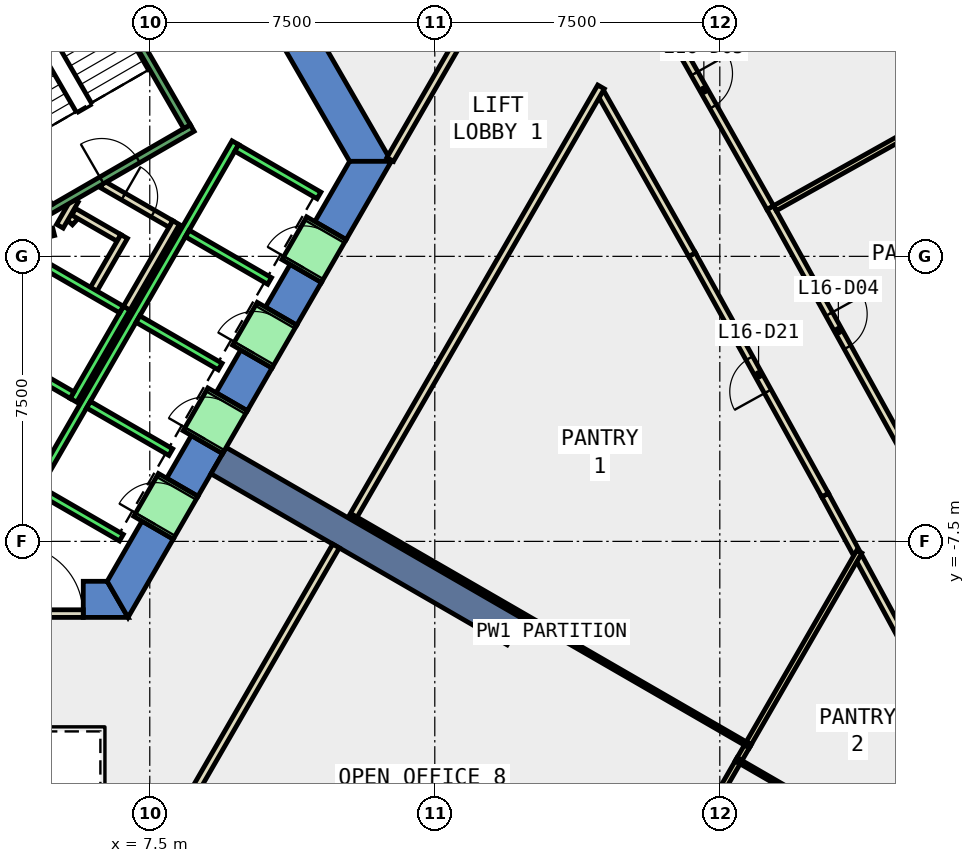
"""IFC4 building model, lengths in metres.
Left out: names, types, materials, properties, quantities, classifications, styles, units other than length and angle.
Written with IfcOpenShell. Run it as: python <this file> out.ifc"""

import sys

from ifc_helpers import new_model, si_unit, direction, frame, frame_2d, origin, place, context, subcontext, project, spatial, polyline, rectangle, outline, extrude, element, fill, save


model = new_model("IFC4")
c1 = context("Model", 3, precision=1e-05, world=origin(), true_north=direction((0.0, 1.0)))
c2 = subcontext(c1, "Body", "Model", "MODEL_VIEW")
j1 = project(units=[si_unit("LENGTHUNIT", "METRE"), si_unit("PLANEANGLEUNIT", "RADIAN")], contexts=[c1])
p1 = place(None, origin())
s1 = spatial("IfcSite", under=j1, at=p1, CompositionType="ELEMENT")
p2 = place(p1, origin())
s2 = spatial("IfcBuilding", under=s1, at=p2, CompositionType="ELEMENT")
p3 = place(p2, frame((0.0, 0.0, 77.0)))
s3 = spatial("IfcBuildingStorey", under=s2, at=p3, CompositionType="ELEMENT", Elevation=77.0)
p4 = place(p3, frame((0.0, 0.0, -0.4)))
e1 = element("IfcWall", 1, at=p4, inside=s3, PredefinedType="SHEAR", context=c2, shape_type="SweptSolid", body=[
    extrude(outline(polyline([(8.517, 11.748), (7.694, 11.273), (12.759, 2.5), (13.856, 2.5), (8.517, 11.748)])), origin(), (0.0, 0.0, 1.0), 4.0),
])
p5 = place(p3, frame((0.0, 0.0, -0.4)))
e2 = element("IfcWall", 2, at=p5, inside=s3, PredefinedType="SHEAR", context=c2, shape_type="SweptSolid", body=[
    extrude(outline(polyline([(5.75, -8.55), (5.75, -9.5), (6.928, -9.5), (6.38, -8.55), (5.75, -8.55)])), origin(), (0.0, 0.0, 1.0), 4.0),
])
p6 = place(p3, frame((0.0, 0.0, -0.4)))
e3 = element("IfcWall", 3, at=p6, inside=s3, PredefinedType="SHEAR", context=c2, shape_type="SweptSolid", body=[
    extrude(outline(polyline([(8.117, -7.44), (7.295, -6.965), (6.38, -8.55), (6.928, -9.5), (8.117, -7.44)])), origin(), (0.0, 0.0, 1.0), 4.0),
])
p7 = place(p3, frame((0.0, 0.0, -0.4)))
e4 = element("IfcWall", 4, at=p7, inside=s3, PredefinedType="SHEAR", context=c2, shape_type="SweptSolid", body=[
    extrude(outline(polyline([(9.417, -5.189), (8.594, -4.714), (7.945, -5.839), (8.767, -6.314), (9.417, -5.189)])), origin(), (0.0, 0.0, 1.0), 4.0),
])
p8 = place(p3, frame((0.0, 0.0, -0.4)))
e5 = element("IfcWall", 5, at=p8, inside=s3, PredefinedType="SHEAR", context=c2, shape_type="SweptSolid", body=[
    extrude(outline(polyline([(10.717, -2.937), (9.894, -2.462), (9.244, -3.588), (10.067, -4.063), (10.717, -2.937)])), origin(), (0.0, 0.0, 1.0), 4.0),
])
p9 = place(p3, frame((0.0, 0.0, -0.4)))
e6 = element("IfcWall", 6, at=p9, inside=s3, PredefinedType="SHEAR", context=c2, shape_type="SweptSolid", body=[
    extrude(outline(polyline([(12.017, -0.686), (11.194, -0.211), (10.544, -1.336), (11.367, -1.811), (12.017, -0.686)])), origin(), (0.0, 0.0, 1.0), 4.0),
])
p10 = place(p3, frame((0.0, 0.0, -0.4)))
e7 = element("IfcWall", 7, at=p10, inside=s3, PredefinedType="SHEAR", context=c2, shape_type="SweptSolid", body=[
    extrude(outline(polyline([(11.844, 0.915), (12.667, 0.44), (13.856, 2.5), (12.759, 2.5), (11.844, 0.915)])), origin(), (0.0, 0.0, 1.0), 4.0),
])
p11 = place(p3, frame((9.31, -5.375, -0.4), z_axis=(0.0, 0.0, 1.0), x_axis=(0.866017533419, -0.500013631625, 0.0)))
e8 = element("IfcWall", 8, at=p11, inside=s3, PredefinedType="SHEAR", context=c2, shape_type="SweptSolid", body=[
    extrude(rectangle(XDim=9.0, YDim=0.8, at=frame_2d((4.5, 0.0))), origin(), (0.0, 0.0, 1.0), 4.0),
])
p12 = place(p3, frame((26.086, -7.789, 0.0), z_axis=(0.0, 0.0, 1.0), x_axis=(-0.475856505621, 0.879522930945, 0.0)))
e9 = element("IfcWall", 9, at=p12, inside=s3, PredefinedType="PARTITIONING", context=c2, shape_type="SweptSolid", body=[
    extrude(rectangle(XDim=1.715, YDim=0.2, at=frame_2d((0.857, 0.0))), origin(), (0.0, 0.0, 1.0), 3.6),
])
p13 = place(p3, frame((25.27, -6.281, 0.0), z_axis=(0.0, 0.0, 1.0), x_axis=(-0.484062485326, 0.875033433818, 0.0)))
e10 = element("IfcWall", 10, at=p13, inside=s3, PredefinedType="PARTITIONING", context=c2, shape_type="SweptSolid", body=[
    extrude(rectangle(XDim=7.23, YDim=0.2, at=frame_2d((3.615, 0.0))), origin(), (0.0, 0.0, 1.0), 3.6),
])
p14 = place(p13, frame((3.115, 0.0, 0.0)))
e11 = element("IfcOpeningElement", 11, at=p14, cuts=e10, PredefinedType="OPENING", context=c2, shape_type="SweptSolid", body=[
    extrude(rectangle(XDim=1.0, YDim=2.1, at=frame_2d((0.5, 1.05))), frame((0.0, 0.11, 0.0), z_axis=(0.0, -1.0, 0.0), x_axis=(1.0, 0.0, 0.0)), (0.0, 0.0, 1.0), 0.22),
])
p15 = place(p3, frame((21.77, 0.046, 0.0), z_axis=(0.0, 0.0, 1.0), x_axis=(-0.492148137455, 0.870511465059, 0.0)))
e12 = element("IfcWall", 12, at=p15, inside=s3, PredefinedType="PARTITIONING", context=c2, shape_type="SweptSolid", body=[
    extrude(rectangle(XDim=4.868, YDim=0.2, at=frame_2d((2.434, 0.0))), origin(), (0.0, 0.0, 1.0), 3.6),
])
p16 = place(p3, frame((28.712, -12.638, 0.0), z_axis=(0.0, 0.0, 1.0), x_axis=(-0.476123321927, 0.8793785205, 0.0)))
e13 = element("IfcWall", 13, at=p16, inside=s3, PredefinedType="PARTITIONING", context=c2, shape_type="SweptSolid", body=[
    extrude(rectangle(XDim=5.364, YDim=0.2, at=frame_2d((2.682, 0.0))), origin(), (0.0, 0.0, 1.0), 3.6),
])
p17 = place(p3, frame((23.828, 1.283, 0.0), z_axis=(0.0, 0.0, 1.0), x_axis=(0.484064127728, -0.875032525251, 0.0)))
e14 = element("IfcWall", 14, at=p17, inside=s3, PredefinedType="PARTITIONING", context=c2, shape_type="SweptSolid", body=[
    extrude(rectangle(XDim=7.251, YDim=0.2, at=frame_2d((3.625, 0.0))), origin(), (0.0, 0.0, 1.0), 3.6),
])
p18 = place(p17, frame((3.201, 0.0, 0.0)))
e15 = element("IfcOpeningElement", 15, at=p18, cuts=e14, PredefinedType="OPENING", context=c2, shape_type="SweptSolid", body=[
    extrude(rectangle(XDim=1.0, YDim=2.1, at=frame_2d((0.5, 1.05))), frame((0.0, 0.11, 0.0), z_axis=(0.0, -1.0, 0.0), x_axis=(1.0, 0.0, 0.0)), (0.0, 0.0, 1.0), 0.22),
])
p19 = place(p3, frame((20.259, 7.596, 0.0), z_axis=(0.0, 0.0, 1.0), x_axis=(0.492021755503, -0.870582903641, 0.0)))
e16 = element("IfcWall", 16, at=p19, inside=s3, PredefinedType="PARTITIONING", context=c2, shape_type="SweptSolid", body=[
    extrude(rectangle(XDim=7.251, YDim=0.2, at=frame_2d((3.626, 0.0))), origin(), (0.0, 0.0, 1.0), 3.6),
])
p20 = place(p19, frame((3.201, 0.0, 0.0)))
e17 = element("IfcOpeningElement", 17, at=p20, cuts=e16, PredefinedType="OPENING", context=c2, shape_type="SweptSolid", body=[
    extrude(rectangle(XDim=1.0, YDim=2.1, at=frame_2d((0.5, 1.05))), frame((0.0, 0.11, 0.0), z_axis=(0.0, -1.0, 0.0), x_axis=(1.0, 0.0, 0.0)), (0.0, 0.0, 1.0), 0.22),
])
p21 = place(p3, frame((5.39, 0.898, 0.0), z_axis=(0.0, 0.0, 1.0), x_axis=(0.673828488714, 0.738887791073, 0.0)))
e18 = element("IfcWall", 18, at=p21, inside=s3, PredefinedType="PARTITIONING", context=c2, shape_type="SweptSolid", body=[
    extrude(rectangle(XDim=0.263, YDim=0.2, at=frame_2d((0.131, 0.0))), origin(), (0.0, 0.0, 1.0), 3.6),
])
p22 = place(p3, frame((5.499, 1.172, 0.0), z_axis=(0.0, 0.0, 1.0), x_axis=(0.866333505267, -0.499465972466, 0.0)))
e19 = element("IfcWall", 19, at=p22, inside=s3, PredefinedType="PARTITIONING", context=c2, shape_type="SweptSolid", body=[
    extrude(rectangle(XDim=1.374, YDim=0.2, at=frame_2d((0.687, 0.0))), origin(), (0.0, 0.0, 1.0), 3.6),
])
p23 = place(p3, frame((6.826, 0.522, 0.0), z_axis=(0.0, 0.0, 1.0), x_axis=(-0.500016722714, -0.866015748706, 0.0)))
e20 = element("IfcWall", 20, at=p23, inside=s3, PredefinedType="PARTITIONING", context=c2, shape_type="SweptSolid", body=[
    extrude(rectangle(XDim=1.7, YDim=0.2, at=frame_2d((0.85, 0.0))), origin(), (0.0, 0.0, 1.0), 3.6),
])
p24 = place(p3, frame((6.25, 1.894, 0.0), z_axis=(0.0, 0.0, 1.0), x_axis=(0.866043184279, -0.499969202016, 0.0)))
e21 = element("IfcWall", 21, at=p24, inside=s3, PredefinedType="PARTITIONING", context=c2, shape_type="SweptSolid", body=[
    extrude(rectangle(XDim=2.084, YDim=0.2, at=frame_2d((1.042, 0.0))), origin(), (0.0, 0.0, 1.0), 3.6),
])
p25 = place(p24, frame((0.642, 0.0, 0.0)))
e22 = element("IfcOpeningElement", 22, at=p25, cuts=e21, PredefinedType="OPENING", context=c2, shape_type="SweptSolid", body=[
    extrude(rectangle(XDim=0.9, YDim=2.1, at=frame_2d((0.45, 1.05))), frame((0.0, 0.11, 0.0), z_axis=(0.0, -1.0, 0.0), x_axis=(1.0, 0.0, 0.0)), (0.0, 0.0, 1.0), 0.22),
])
p26 = place(p3, frame((8.192, 0.888, 0.0), z_axis=(0.0, 0.0, 1.0), x_axis=(-0.499940625693, -0.866059680843, 0.0)))
e23 = element("IfcWall", 23, at=p26, inside=s3, PredefinedType="PARTITIONING", context=c2, shape_type="SweptSolid", body=[
    extrude(rectangle(XDim=2.68, YDim=0.2, at=frame_2d((1.34, 0.0))), origin(), (0.0, 0.0, 1.0), 3.6),
])
p27 = place(p3, frame((5.135, 0.793, 0.0), z_axis=(0.0, 0.0, 1.0), x_axis=(0.499526442893, 0.866298639529, 0.0)))
e24 = element("IfcWall", 24, at=p27, inside=s3, PredefinedType="PARTITIONING", context=c2, shape_type="SweptSolid", body=[
    extrude(rectangle(XDim=0.791, YDim=0.2, at=frame_2d((0.396, 0.0))), origin(), (0.0, 0.0, 1.0), 3.6),
])
p28 = place(p3, frame((13.827, 2.55, 0.0), z_axis=(0.0, 0.0, 1.0), x_axis=(0.500039204794, 0.866002767703, 0.0)))
e25 = element("IfcWall", 25, at=p28, inside=s3, PredefinedType="PARTITIONING", context=c2, shape_type="SweptSolid", body=[
    extrude(rectangle(XDim=6.672, YDim=0.2, at=frame_2d((3.336, 0.0))), origin(), (0.0, 0.0, 1.0), 3.6),
])
p29 = place(p3, frame((4.644, 0.564, 0.0), z_axis=(0.0, 0.0, 1.0), x_axis=(0.969929076366, 0.243387729394, 0.0)))
e26 = element("IfcWall", 26, at=p29, inside=s3, PredefinedType="PARTITIONING", context=c2, shape_type="SweptSolid", body=[
    extrude(rectangle(XDim=0.337, YDim=0.2, at=frame_2d((0.168, 0.0))), origin(), (0.0, 0.0, 1.0), 3.6),
])
p30 = place(p3, frame((12.4, -7.621, 0.0), z_axis=(0.0, 0.0, 1.0), x_axis=(-0.49990497871, -0.866080257402, 0.0)))
e27 = element("IfcWall", 27, at=p30, inside=s3, PredefinedType="PARTITIONING", context=c2, shape_type="SweptSolid", body=[
    extrude(rectangle(XDim=9.302, YDim=0.2, at=frame_2d((4.651, 0.0))), origin(), (0.0, 0.0, 1.0), 3.6),
])
p31 = place(p3, frame((19.374, 4.458, 0.0), z_axis=(0.0, 0.0, 1.0), x_axis=(-0.499973880856, -0.866040483154, 0.0)))
e28 = element("IfcWall", 28, at=p31, inside=s3, PredefinedType="PARTITIONING", context=c2, shape_type="SweptSolid", body=[
    extrude(rectangle(XDim=13.113, YDim=0.2, at=frame_2d((6.556, 0.0))), origin(), (0.0, 0.0, 1.0), 3.6),
])
p32 = place(p3, frame((12.843, -6.855, 0.0), z_axis=(0.0, 0.0, 1.0), x_axis=(0.866054959007, -0.499948805358, 0.0)))
e29 = element("IfcWall", 29, at=p32, inside=s3, PredefinedType="PARTITIONING", context=c2, shape_type="SweptSolid", body=[
    extrude(rectangle(XDim=12.075, YDim=0.1, at=frame_2d((6.038, 0.0))), origin(), (0.0, 0.0, 1.0), 3.6),
])
p33 = place(p3, frame((22.969, -13.316, 0.0), z_axis=(0.0, 0.0, 1.0), x_axis=(-0.500007312183, -0.866021182053, 0.0)))
e30 = element("IfcWall", 30, at=p33, inside=s3, PredefinedType="PARTITIONING", context=c2, shape_type="SweptSolid", body=[
    extrude(rectangle(XDim=6.306, YDim=0.15, at=frame_2d((3.153, 0.0))), origin(), (0.0, 0.0, 1.0), 3.6),
])
p34 = place(p3, frame((23.211, -12.898, 0.0), z_axis=(0.0, 0.0, 1.0), x_axis=(-0.501488909663, -0.865164073159, 0.0)))
e31 = element("IfcWall", 31, at=p34, inside=s3, PredefinedType="PARTITIONING", context=c2, shape_type="SweptSolid", body=[
    extrude(rectangle(XDim=0.383, YDim=0.15, at=frame_2d((0.191, 0.0))), origin(), (0.0, 0.0, 1.0), 3.6),
])
p35 = place(p3, frame((26.172, -7.768, 0.0), z_axis=(0.0, 0.0, 1.0), x_axis=(-0.499945058274, -0.866057122081, 0.0)))
e32 = element("IfcWall", 32, at=p35, inside=s3, PredefinedType="PARTITIONING", context=c2, shape_type="SweptSolid", body=[
    extrude(rectangle(XDim=5.823, YDim=0.15, at=frame_2d((2.912, 0.0))), origin(), (0.0, 0.0, 1.0), 3.6),
])
p36 = place(p3, frame((22.929, -13.235, 0.0), z_axis=(0.0, 0.0, 1.0), x_axis=(0.866003823807, -0.500037375755, 0.0)))
e33 = element("IfcWall", 33, at=p36, inside=s3, PredefinedType="PARTITIONING", context=c2, shape_type="SweptSolid", body=[
    extrude(rectangle(XDim=10.245, YDim=0.1, at=frame_2d((5.123, 0.0))), origin(), (0.0, 0.0, 1.0), 3.6),
])
p37 = place(p3, frame((23.951, 1.266, 0.0), z_axis=(0.0, 0.0, 1.0), x_axis=(0.872786908026, 0.488101437385, 0.0)))
e34 = element("IfcWall", 34, at=p37, inside=s3, PredefinedType="PARTITIONING", context=c2, shape_type="SweptSolid", body=[
    extrude(rectangle(XDim=6.681, YDim=0.15, at=frame_2d((3.34, 0.0))), origin(), (0.0, 0.0, 1.0), 3.6),
])
p38 = place(p3, frame((3.75, -9.4, 0.0), z_axis=(0.0, 0.0, 1.0), x_axis=(1.0, 0.0, 0.0)))
e35 = element("IfcWall", 35, at=p38, inside=s3, PredefinedType="PARTITIONING", context=c2, shape_type="SweptSolid", body=[
    extrude(rectangle(XDim=2.0, YDim=0.2, at=frame_2d((1.0, 0.0))), origin(), (0.0, 0.0, 1.0), 2.4),
])
p39 = place(p38, frame((0.19, 0.0, 0.0)))
e36 = element("IfcOpeningElement", 36, at=p39, cuts=e35, PredefinedType="OPENING", context=c2, shape_type="SweptSolid", body=[
    extrude(rectangle(XDim=1.8, YDim=2.1, at=frame_2d((0.9, 1.05))), frame((0.0, 0.11, 0.0), z_axis=(0.0, -1.0, 0.0), x_axis=(1.0, 0.0, 0.0)), (0.0, 0.0, 1.0), 0.22),
])
p40 = place(p3, frame((5.492, -3.788, 0.0), z_axis=(0.0, 0.0, 1.0), x_axis=(0.500011755427, 0.866018616679, 0.0)))
e37 = element("IfcWall", 37, at=p40, inside=s3, PredefinedType="STANDARD", context=c2, shape_type="SweptSolid", body=[
    extrude(rectangle(XDim=2.8, YDim=0.2, at=frame_2d((1.4, 0.0))), origin(), (0.0, 0.0, 1.0), 3.6),
])
p41 = place(p3, frame((3.377, -2.452, 0.0), z_axis=(0.0, 0.0, 1.0), x_axis=(0.865955154139, -0.50012165622, 0.0)))
e38 = element("IfcWall", 38, at=p41, inside=s3, PredefinedType="STANDARD", context=c2, shape_type="SweptSolid", body=[
    extrude(rectangle(XDim=2.4, YDim=0.2, at=frame_2d((1.2, 0.0))), origin(), (0.0, 0.0, 1.0), 3.6),
])
p42 = place(p3, frame((4.677, -0.2, 0.0), z_axis=(0.0, 0.0, 1.0), x_axis=(0.865973769406, -0.500089422704, 0.0)))
e39 = element("IfcWall", 39, at=p42, inside=s3, PredefinedType="STANDARD", context=c2, shape_type="SweptSolid", body=[
    extrude(rectangle(XDim=2.399, YDim=0.2, at=frame_2d((1.2, 0.0))), origin(), (0.0, 0.0, 1.0), 3.6),
])
p43 = place(p3, frame((4.451, -6.19, 0.0), z_axis=(0.0, 0.0, 1.0), x_axis=(0.50000090737, 0.866024879913, 0.0)))
e40 = element("IfcWall", 40, at=p43, inside=s3, PredefinedType="STANDARD", context=c2, shape_type="SweptSolid", body=[
    extrude(rectangle(XDim=10.6, YDim=0.2, at=frame_2d((5.3, 0.0))), origin(), (0.0, 0.0, 1.0), 3.6),
])
for number, where, z_axis, x_axis in (
    (41, (4.588, -6.153, 0.0), (0.0, 0.0, 1.0), (0.866, -0.5, 0.0)),
    (42, (5.888, -3.902, 0.0), (0.0, 0.0, 1.0), (0.866, -0.5, 0.0)),
    (43, (7.188, -1.65, 0.0), (0.0, 0.0, 1.0), (0.866, -0.5, 0.0)),
    (44, (8.488, 0.602, 0.0), (0.0, 0.0, 1.0), (0.866, -0.5, 0.0)),
):
    element("IfcWall", number, at=place(p3, frame(where, z_axis=z_axis, x_axis=x_axis)), inside=s3, PredefinedType="STANDARD", context=c2, shape_type="SweptSolid", body=[
        extrude(rectangle(XDim=2.5, YDim=0.2, at=frame_2d((1.25, 0.0))), origin(), (0.0, 0.0, 1.0), 3.6),
    ])
p44 = place(p3, frame((9.788, 2.853, 0.0), z_axis=(0.0, 0.0, 1.0), x_axis=(0.865998541277, -0.500046524342, 0.0)))
e45 = element("IfcWall", 45, at=p44, inside=s3, PredefinedType="STANDARD", context=c2, shape_type="SweptSolid", body=[
    extrude(rectangle(XDim=2.5, YDim=0.2, at=frame_2d((1.25, 0.0))), origin(), (0.0, 0.0, 1.0), 3.6),
])
p45 = place(p3, frame((7.598, -7.14, 0.0), z_axis=(0.0, 0.0, 1.0), x_axis=(0.500362116554, 0.865816234728, 0.0)))
e46 = element("IfcWall", 46, at=p45, inside=s3, PredefinedType="STANDARD", context=c2, shape_type="SweptSolid", body=[
    extrude(rectangle(XDim=1.299, YDim=1.2, at=frame_2d((0.65, 0.0))), origin(), (0.0, 0.0, 1.0), 2.4),
])
p46 = place(p45, frame((0.1, 0.0, 0.0)))
e47 = element("IfcOpeningElement", 47, at=p46, cuts=e46, PredefinedType="OPENING", context=c2, shape_type="SweptSolid", body=[
    extrude(rectangle(XDim=1.1, YDim=2.3, at=frame_2d((0.55, 1.15))), frame((0.0, 0.61, 0.0), z_axis=(0.0, -1.0, 0.0), x_axis=(1.0, 0.0, 0.0)), (0.0, 0.0, 1.0), 1.22),
])
p47 = place(p3, frame((8.898, -4.889, 0.0), z_axis=(0.0, 0.0, 1.0), x_axis=(0.500036693733, 0.866004217611, 0.0)))
e48 = element("IfcWall", 48, at=p47, inside=s3, PredefinedType="STANDARD", context=c2, shape_type="SweptSolid", body=[
    extrude(rectangle(XDim=1.3, YDim=1.2, at=frame_2d((0.65, 0.0))), origin(), (0.0, 0.0, 1.0), 2.4),
])
p48 = place(p47, frame((0.1, 0.0, 0.0)))
e49 = element("IfcOpeningElement", 49, at=p48, cuts=e48, PredefinedType="OPENING", context=c2, shape_type="SweptSolid", body=[
    extrude(rectangle(XDim=1.1, YDim=2.3, at=frame_2d((0.55, 1.15))), frame((0.0, 0.61, 0.0), z_axis=(0.0, -1.0, 0.0), x_axis=(1.0, 0.0, 0.0)), (0.0, 0.0, 1.0), 1.22),
])
p49 = place(p3, frame((10.198, -2.637, 0.0), z_axis=(0.0, 0.0, 1.0), x_axis=(0.49989585183, 0.866085525409, 0.0)))
e50 = element("IfcWall", 50, at=p49, inside=s3, PredefinedType="STANDARD", context=c2, shape_type="SweptSolid", body=[
    extrude(rectangle(XDim=1.3, YDim=1.2, at=frame_2d((0.65, 0.0))), origin(), (0.0, 0.0, 1.0), 2.4),
])
p50 = place(p49, frame((0.1, 0.0, 0.0)))
e51 = element("IfcOpeningElement", 51, at=p50, cuts=e50, PredefinedType="OPENING", context=c2, shape_type="SweptSolid", body=[
    extrude(rectangle(XDim=1.1, YDim=2.3, at=frame_2d((0.55, 1.15))), frame((0.0, 0.61, 0.0), z_axis=(0.0, -1.0, 0.0), x_axis=(1.0, 0.0, 0.0)), (0.0, 0.0, 1.0), 1.22),
])
p51 = place(p3, frame((11.498, -0.385, 0.0), z_axis=(0.0, 0.0, 1.0), x_axis=(0.500221244143, 0.865897630733, 0.0)))
e52 = element("IfcWall", 52, at=p51, inside=s3, PredefinedType="STANDARD", context=c2, shape_type="SweptSolid", body=[
    extrude(rectangle(XDim=1.299, YDim=1.2, at=frame_2d((0.65, 0.0))), origin(), (0.0, 0.0, 1.0), 2.4),
])
p52 = place(p51, frame((0.1, 0.0, 0.0)))
e53 = element("IfcOpeningElement", 53, at=p52, cuts=e52, PredefinedType="OPENING", context=c2, shape_type="SweptSolid", body=[
    extrude(rectangle(XDim=1.1, YDim=2.3, at=frame_2d((0.55, 1.15))), frame((0.0, 0.61, 0.0), z_axis=(0.0, -1.0, 0.0), x_axis=(1.0, 0.0, 0.0)), (0.0, 0.0, 1.0), 1.22),
])
p53 = place(p3, frame((4.806, 1.176, 0.0), z_axis=(0.0, 0.0, 1.0), x_axis=(0.866059941101, 0.499940174841, 0.0)))
e54 = element("IfcWall", 54, at=p53, inside=s3, PredefinedType="STANDARD", context=c2, shape_type="SweptSolid", body=[
    extrude(rectangle(XDim=4.4, YDim=0.2, at=frame_2d((2.2, 0.0))), origin(), (0.0, 0.0, 1.0), 3.6),
])
p54 = place(p53, frame((1.65, 0.0, 0.0)))
e55 = element("IfcOpeningElement", 55, at=p54, cuts=e54, PredefinedType="OPENING", context=c2, shape_type="SweptSolid", body=[
    extrude(rectangle(XDim=1.1, YDim=2.2, at=frame_2d((0.55, 1.1))), frame((0.0, 0.11, 0.0), z_axis=(0.0, -1.0, 0.0), x_axis=(1.0, 0.0, 0.0)), (0.0, 0.0, 1.0), 0.22),
])
p55 = place(p3, frame((8.48, 3.412, 0.0), z_axis=(0.0, 0.0, 1.0), x_axis=(-0.499978703459, 0.866037698999, 0.0)))
e56 = element("IfcWall", 56, at=p55, inside=s3, PredefinedType="STANDARD", context=c2, shape_type="SweptSolid", body=[
    extrude(rectangle(XDim=6.9, YDim=0.2, at=frame_2d((3.45, 0.0))), origin(), (0.0, 0.0, 1.0), 3.6),
])
p56 = place(p18, origin())
e57 = element("IfcDoor", 57, at=p56, inside=s3, OperationType="SINGLE_SWING_LEFT", PredefinedType="DOOR", context=c2, shape_type="SweptSolid", body=[
    extrude(rectangle(XDim=1.0, YDim=2.1, at=frame_2d((0.5, 1.05))), frame((0.0, 0.025, 0.0), z_axis=(0.0, -1.0, 0.0), x_axis=(1.0, 0.0, 0.0)), (0.0, 0.0, 1.0), 0.05),
])
fill(e15, e57)
p57 = place(p20, origin())
e58 = element("IfcDoor", 58, at=p57, inside=s3, OperationType="SINGLE_SWING_LEFT", PredefinedType="DOOR", context=c2, shape_type="SweptSolid", body=[
    extrude(rectangle(XDim=1.0, YDim=2.1, at=frame_2d((0.5, 1.05))), frame((0.0, 0.025, 0.0), z_axis=(0.0, -1.0, 0.0), x_axis=(1.0, 0.0, 0.0)), (0.0, 0.0, 1.0), 0.05),
])
fill(e17, e58)
p58 = place(p14, origin())
e59 = element("IfcDoor", 59, at=p58, inside=s3, OperationType="SINGLE_SWING_RIGHT", PredefinedType="DOOR", context=c2, shape_type="SweptSolid", body=[
    extrude(rectangle(XDim=1.0, YDim=2.1, at=frame_2d((0.5, 1.05))), frame((0.0, 0.025, 0.0), z_axis=(0.0, -1.0, 0.0), x_axis=(1.0, 0.0, 0.0)), (0.0, 0.0, 1.0), 0.05),
])
fill(e11, e59)
p59 = place(p25, origin())
e60 = element("IfcDoor", 60, at=p59, inside=s3, OperationType="SINGLE_SWING_LEFT", PredefinedType="DOOR", context=c2, shape_type="SweptSolid", body=[
    extrude(rectangle(XDim=0.9, YDim=2.1, at=frame_2d((0.45, 1.05))), frame((0.0, 0.025, 0.0), z_axis=(0.0, -1.0, 0.0), x_axis=(1.0, 0.0, 0.0)), (0.0, 0.0, 1.0), 0.05),
])
fill(e22, e60)
p60 = place(p39, origin())
e61 = element("IfcDoor", 61, at=p60, inside=s3, OperationType="DOUBLE_DOOR_SINGLE_SWING", PredefinedType="DOOR", context=c2, shape_type="SweptSolid", body=[
    extrude(rectangle(XDim=1.8, YDim=2.1, at=frame_2d((0.9, 1.05))), frame((0.0, 0.025, 0.0), z_axis=(0.0, -1.0, 0.0), x_axis=(1.0, 0.0, 0.0)), (0.0, 0.0, 1.0), 0.05),
])
fill(e36, e61)
p61 = place(p46, origin())
e62 = element("IfcDoor", 62, at=p61, inside=s3, OperationType="SLIDING_TO_LEFT", PredefinedType="DOOR", context=c2, shape_type="SweptSolid", body=[
    extrude(rectangle(XDim=1.1, YDim=2.3, at=frame_2d((0.55, 1.15))), frame((0.0, 0.025, 0.0), z_axis=(0.0, -1.0, 0.0), x_axis=(1.0, 0.0, 0.0)), (0.0, 0.0, 1.0), 0.05),
])
fill(e47, e62)
p62 = place(p48, origin())
e63 = element("IfcDoor", 63, at=p62, inside=s3, OperationType="SLIDING_TO_LEFT", PredefinedType="DOOR", context=c2, shape_type="SweptSolid", body=[
    extrude(rectangle(XDim=1.1, YDim=2.3, at=frame_2d((0.55, 1.15))), frame((0.0, 0.025, 0.0), z_axis=(0.0, -1.0, 0.0), x_axis=(1.0, 0.0, 0.0)), (0.0, 0.0, 1.0), 0.05),
])
fill(e49, e63)
p63 = place(p50, origin())
e64 = element("IfcDoor", 64, at=p63, inside=s3, OperationType="SLIDING_TO_LEFT", PredefinedType="DOOR", context=c2, shape_type="SweptSolid", body=[
    extrude(rectangle(XDim=1.1, YDim=2.3, at=frame_2d((0.55, 1.15))), frame((0.0, 0.025, 0.0), z_axis=(0.0, -1.0, 0.0), x_axis=(1.0, 0.0, 0.0)), (0.0, 0.0, 1.0), 0.05),
])
fill(e51, e64)
p64 = place(p52, origin())
e65 = element("IfcDoor", 65, at=p64, inside=s3, OperationType="SLIDING_TO_LEFT", PredefinedType="DOOR", context=c2, shape_type="SweptSolid", body=[
    extrude(rectangle(XDim=1.1, YDim=2.3, at=frame_2d((0.55, 1.15))), frame((0.0, 0.025, 0.0), z_axis=(0.0, -1.0, 0.0), x_axis=(1.0, 0.0, 0.0)), (0.0, 0.0, 1.0), 0.05),
])
fill(e53, e65)
p65 = place(p54, origin())
e66 = element("IfcDoor", 66, at=p65, inside=s3, OperationType="SINGLE_SWING_LEFT", PredefinedType="DOOR", context=c2, shape_type="SweptSolid", body=[
    extrude(rectangle(XDim=1.1, YDim=2.2, at=frame_2d((0.55, 1.1))), frame((0.0, 0.025, 0.0), z_axis=(0.0, -1.0, 0.0), x_axis=(1.0, 0.0, 0.0)), (0.0, 0.0, 1.0), 0.05),
])
fill(e55, e66)
save(model, sys.argv[1])
